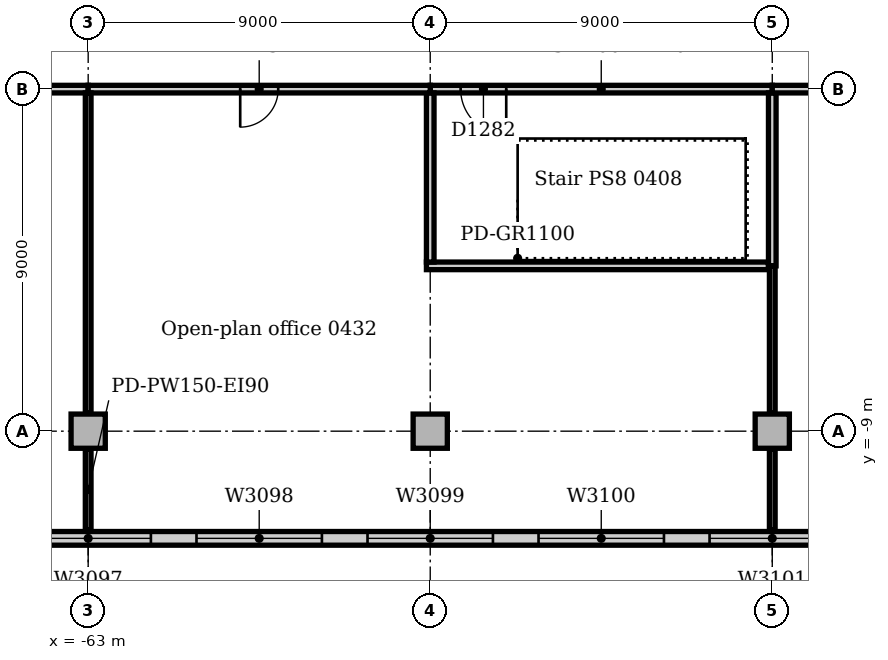
"""IFC4 building model, lengths in metres.
Left out: names, types, materials, properties, quantities, classifications, styles, units other than length and angle.
Written with IfcOpenShell. Run it as: python <this file> out.ifc"""

import sys

from ifc_helpers import new_model, si_unit, direction, frame, frame_2d, origin, origin_2d, place, context, subcontext, project, spatial, rectangle, extrude, element, fill, save


model = new_model("IFC4")
c1 = context("Model", 3, precision=1e-05, world=origin(), true_north=direction((0.0, 1.0)))
c2 = subcontext(c1, "Body", "Model", "MODEL_VIEW")
j1 = project(units=[si_unit("LENGTHUNIT", "METRE"), si_unit("PLANEANGLEUNIT", "RADIAN")], contexts=[c1])
p1 = place(None, origin())
s1 = spatial("IfcSite", under=j1, at=p1, CompositionType="ELEMENT")
p2 = place(p1, origin())
s2 = spatial("IfcBuilding", under=s1, at=p2, CompositionType="ELEMENT")
p3 = place(p2, frame((0.0, 0.0, 21.0)))
s3 = spatial("IfcBuildingStorey", under=s2, at=p3, CompositionType="ELEMENT", Elevation=21.0)
for number, where, z_axis, x_axis in (
    (1, (-63.0, -9.0, 0.0), (0.0, 0.0, 1.0), (1.0, 0.0, 0.0)),
    (2, (-54.0, -9.0, 0.0), (0.0, 0.0, 1.0), (1.0, 0.0, 0.0)),
    (3, (-45.0, -9.0, 0.0), (0.0, 0.0, 1.0), (1.0, 0.0, 0.0)),
):
    element("IfcColumn", number, at=place(p3, frame(where, z_axis=z_axis, x_axis=x_axis)), inside=s3, PredefinedType="COLUMN", context=c2, shape_type="SweptSolid", body=[
        extrude(rectangle(XDim=0.9, YDim=0.9, at=origin_2d()), origin(), (0.0, 0.0, 1.0), 4.7),
    ])
p4 = place(p3, frame((-81.0, -11.82, 0.0), z_axis=(0.0, 0.0, 1.0), x_axis=(1.0, 0.0, 0.0)))
e4 = element("IfcWall", 4, at=p4, inside=s3, PredefinedType="STANDARD", context=c2, shape_type="SweptSolid", body=[
    extrude(rectangle(XDim=144.0, YDim=0.36, at=frame_2d((72.0, 0.0))), origin(), (0.0, 0.0, 1.0), 4.85),
])
p5 = place(p4, frame((2.85, 0.0, 0.9)))
e5 = element("IfcOpeningElement", 5, at=p5, cuts=e4, PredefinedType="OPENING", context=c2, shape_type="SweptSolid", body=[
    extrude(rectangle(XDim=3.3, YDim=2.4, at=frame_2d((1.65, 1.2))), frame((0.0, 0.19, 0.0), z_axis=(0.0, -1.0, 0.0), x_axis=(1.0, 0.0, 0.0)), (0.0, 0.0, 1.0), 0.38),
])
p6 = place(p4, frame((7.35, 0.0, 0.9)))
e6 = element("IfcOpeningElement", 6, at=p6, cuts=e4, PredefinedType="OPENING", context=c2, shape_type="SweptSolid", body=[
    extrude(rectangle(XDim=3.3, YDim=2.4, at=frame_2d((1.65, 1.2))), frame((0.0, 0.19, 0.0), z_axis=(0.0, -1.0, 0.0), x_axis=(1.0, 0.0, 0.0)), (0.0, 0.0, 1.0), 0.38),
])
p7 = place(p4, frame((11.85, 0.0, 0.9)))
e7 = element("IfcOpeningElement", 7, at=p7, cuts=e4, PredefinedType="OPENING", context=c2, shape_type="SweptSolid", body=[
    extrude(rectangle(XDim=3.3, YDim=2.4, at=frame_2d((1.65, 1.2))), frame((0.0, 0.19, 0.0), z_axis=(0.0, -1.0, 0.0), x_axis=(1.0, 0.0, 0.0)), (0.0, 0.0, 1.0), 0.38),
])
p8 = place(p4, frame((16.35, 0.0, 0.9)))
e8 = element("IfcOpeningElement", 8, at=p8, cuts=e4, PredefinedType="OPENING", context=c2, shape_type="SweptSolid", body=[
    extrude(rectangle(XDim=3.3, YDim=2.4, at=frame_2d((1.65, 1.2))), frame((0.0, 0.19, 0.0), z_axis=(0.0, -1.0, 0.0), x_axis=(1.0, 0.0, 0.0)), (0.0, 0.0, 1.0), 0.38),
])
p9 = place(p4, frame((20.85, 0.0, 0.9)))
e9 = element("IfcOpeningElement", 9, at=p9, cuts=e4, PredefinedType="OPENING", context=c2, shape_type="SweptSolid", body=[
    extrude(rectangle(XDim=3.3, YDim=2.4, at=frame_2d((1.65, 1.2))), frame((0.0, 0.19, 0.0), z_axis=(0.0, -1.0, 0.0), x_axis=(1.0, 0.0, 0.0)), (0.0, 0.0, 1.0), 0.38),
])
p10 = place(p4, frame((25.35, 0.0, 0.9)))
e10 = element("IfcOpeningElement", 10, at=p10, cuts=e4, PredefinedType="OPENING", context=c2, shape_type="SweptSolid", body=[
    extrude(rectangle(XDim=3.3, YDim=2.4, at=frame_2d((1.65, 1.2))), frame((0.0, 0.19, 0.0), z_axis=(0.0, -1.0, 0.0), x_axis=(1.0, 0.0, 0.0)), (0.0, 0.0, 1.0), 0.38),
])
p11 = place(p4, frame((29.85, 0.0, 0.9)))
e11 = element("IfcOpeningElement", 11, at=p11, cuts=e4, PredefinedType="OPENING", context=c2, shape_type="SweptSolid", body=[
    extrude(rectangle(XDim=3.3, YDim=2.4, at=frame_2d((1.65, 1.2))), frame((0.0, 0.19, 0.0), z_axis=(0.0, -1.0, 0.0), x_axis=(1.0, 0.0, 0.0)), (0.0, 0.0, 1.0), 0.38),
])
p12 = place(p4, frame((34.35, 0.0, 0.9)))
e12 = element("IfcOpeningElement", 12, at=p12, cuts=e4, PredefinedType="OPENING", context=c2, shape_type="SweptSolid", body=[
    extrude(rectangle(XDim=3.3, YDim=2.4, at=frame_2d((1.65, 1.2))), frame((0.0, 0.19, 0.0), z_axis=(0.0, -1.0, 0.0), x_axis=(1.0, 0.0, 0.0)), (0.0, 0.0, 1.0), 0.38),
])
p13 = place(p4, frame((38.85, 0.0, 0.9)))
e13 = element("IfcOpeningElement", 13, at=p13, cuts=e4, PredefinedType="OPENING", context=c2, shape_type="SweptSolid", body=[
    extrude(rectangle(XDim=3.3, YDim=2.4, at=frame_2d((1.65, 1.2))), frame((0.0, 0.19, 0.0), z_axis=(0.0, -1.0, 0.0), x_axis=(1.0, 0.0, 0.0)), (0.0, 0.0, 1.0), 0.38),
])
p14 = place(p4, frame((43.35, 0.0, 0.9)))
e14 = element("IfcOpeningElement", 14, at=p14, cuts=e4, PredefinedType="OPENING", context=c2, shape_type="SweptSolid", body=[
    extrude(rectangle(XDim=3.3, YDim=2.4, at=frame_2d((1.65, 1.2))), frame((0.0, 0.19, 0.0), z_axis=(0.0, -1.0, 0.0), x_axis=(1.0, 0.0, 0.0)), (0.0, 0.0, 1.0), 0.38),
])
p15 = place(p4, frame((47.85, 0.0, 0.9)))
e15 = element("IfcOpeningElement", 15, at=p15, cuts=e4, PredefinedType="OPENING", context=c2, shape_type="SweptSolid", body=[
    extrude(rectangle(XDim=3.3, YDim=2.4, at=frame_2d((1.65, 1.2))), frame((0.0, 0.19, 0.0), z_axis=(0.0, -1.0, 0.0), x_axis=(1.0, 0.0, 0.0)), (0.0, 0.0, 1.0), 0.38),
])
p16 = place(p4, frame((52.35, 0.0, 0.9)))
e16 = element("IfcOpeningElement", 16, at=p16, cuts=e4, PredefinedType="OPENING", context=c2, shape_type="SweptSolid", body=[
    extrude(rectangle(XDim=3.3, YDim=2.4, at=frame_2d((1.65, 1.2))), frame((0.0, 0.19, 0.0), z_axis=(0.0, -1.0, 0.0), x_axis=(1.0, 0.0, 0.0)), (0.0, 0.0, 1.0), 0.38),
])
p17 = place(p4, frame((56.85, 0.0, 0.9)))
e17 = element("IfcOpeningElement", 17, at=p17, cuts=e4, PredefinedType="OPENING", context=c2, shape_type="SweptSolid", body=[
    extrude(rectangle(XDim=3.3, YDim=2.4, at=frame_2d((1.65, 1.2))), frame((0.0, 0.19, 0.0), z_axis=(0.0, -1.0, 0.0), x_axis=(1.0, 0.0, 0.0)), (0.0, 0.0, 1.0), 0.38),
])
p18 = place(p4, frame((61.35, 0.0, 0.9)))
e18 = element("IfcOpeningElement", 18, at=p18, cuts=e4, PredefinedType="OPENING", context=c2, shape_type="SweptSolid", body=[
    extrude(rectangle(XDim=3.3, YDim=2.4, at=frame_2d((1.65, 1.2))), frame((0.0, 0.19, 0.0), z_axis=(0.0, -1.0, 0.0), x_axis=(1.0, 0.0, 0.0)), (0.0, 0.0, 1.0), 0.38),
])
p19 = place(p4, frame((65.85, 0.0, 0.9)))
e19 = element("IfcOpeningElement", 19, at=p19, cuts=e4, PredefinedType="OPENING", context=c2, shape_type="SweptSolid", body=[
    extrude(rectangle(XDim=3.3, YDim=2.4, at=frame_2d((1.65, 1.2))), frame((0.0, 0.19, 0.0), z_axis=(0.0, -1.0, 0.0), x_axis=(1.0, 0.0, 0.0)), (0.0, 0.0, 1.0), 0.38),
])
p20 = place(p4, frame((70.35, 0.0, 0.9)))
e20 = element("IfcOpeningElement", 20, at=p20, cuts=e4, PredefinedType="OPENING", context=c2, shape_type="SweptSolid", body=[
    extrude(rectangle(XDim=3.3, YDim=2.4, at=frame_2d((1.65, 1.2))), frame((0.0, 0.19, 0.0), z_axis=(0.0, -1.0, 0.0), x_axis=(1.0, 0.0, 0.0)), (0.0, 0.0, 1.0), 0.38),
])
p21 = place(p4, frame((74.85, 0.0, 0.9)))
e21 = element("IfcOpeningElement", 21, at=p21, cuts=e4, PredefinedType="OPENING", context=c2, shape_type="SweptSolid", body=[
    extrude(rectangle(XDim=3.3, YDim=2.4, at=frame_2d((1.65, 1.2))), frame((0.0, 0.19, 0.0), z_axis=(0.0, -1.0, 0.0), x_axis=(1.0, 0.0, 0.0)), (0.0, 0.0, 1.0), 0.38),
])
p22 = place(p4, frame((79.35, 0.0, 0.9)))
e22 = element("IfcOpeningElement", 22, at=p22, cuts=e4, PredefinedType="OPENING", context=c2, shape_type="SweptSolid", body=[
    extrude(rectangle(XDim=3.3, YDim=2.4, at=frame_2d((1.65, 1.2))), frame((0.0, 0.19, 0.0), z_axis=(0.0, -1.0, 0.0), x_axis=(1.0, 0.0, 0.0)), (0.0, 0.0, 1.0), 0.38),
])
p23 = place(p4, frame((83.85, 0.0, 0.9)))
e23 = element("IfcOpeningElement", 23, at=p23, cuts=e4, PredefinedType="OPENING", context=c2, shape_type="SweptSolid", body=[
    extrude(rectangle(XDim=3.3, YDim=2.4, at=frame_2d((1.65, 1.2))), frame((0.0, 0.19, 0.0), z_axis=(0.0, -1.0, 0.0), x_axis=(1.0, 0.0, 0.0)), (0.0, 0.0, 1.0), 0.38),
])
p24 = place(p4, frame((88.35, 0.0, 0.9)))
e24 = element("IfcOpeningElement", 24, at=p24, cuts=e4, PredefinedType="OPENING", context=c2, shape_type="SweptSolid", body=[
    extrude(rectangle(XDim=3.3, YDim=2.4, at=frame_2d((1.65, 1.2))), frame((0.0, 0.19, 0.0), z_axis=(0.0, -1.0, 0.0), x_axis=(1.0, 0.0, 0.0)), (0.0, 0.0, 1.0), 0.38),
])
p25 = place(p4, frame((92.85, 0.0, 0.9)))
e25 = element("IfcOpeningElement", 25, at=p25, cuts=e4, PredefinedType="OPENING", context=c2, shape_type="SweptSolid", body=[
    extrude(rectangle(XDim=3.3, YDim=2.4, at=frame_2d((1.65, 1.2))), frame((0.0, 0.19, 0.0), z_axis=(0.0, -1.0, 0.0), x_axis=(1.0, 0.0, 0.0)), (0.0, 0.0, 1.0), 0.38),
])
p26 = place(p4, frame((97.35, 0.0, 0.9)))
e26 = element("IfcOpeningElement", 26, at=p26, cuts=e4, PredefinedType="OPENING", context=c2, shape_type="SweptSolid", body=[
    extrude(rectangle(XDim=3.3, YDim=2.4, at=frame_2d((1.65, 1.2))), frame((0.0, 0.19, 0.0), z_axis=(0.0, -1.0, 0.0), x_axis=(1.0, 0.0, 0.0)), (0.0, 0.0, 1.0), 0.38),
])
p27 = place(p4, frame((101.85, 0.0, 0.9)))
e27 = element("IfcOpeningElement", 27, at=p27, cuts=e4, PredefinedType="OPENING", context=c2, shape_type="SweptSolid", body=[
    extrude(rectangle(XDim=3.3, YDim=2.4, at=frame_2d((1.65, 1.2))), frame((0.0, 0.19, 0.0), z_axis=(0.0, -1.0, 0.0), x_axis=(1.0, 0.0, 0.0)), (0.0, 0.0, 1.0), 0.38),
])
p28 = place(p4, frame((106.35, 0.0, 0.9)))
e28 = element("IfcOpeningElement", 28, at=p28, cuts=e4, PredefinedType="OPENING", context=c2, shape_type="SweptSolid", body=[
    extrude(rectangle(XDim=3.3, YDim=2.4, at=frame_2d((1.65, 1.2))), frame((0.0, 0.19, 0.0), z_axis=(0.0, -1.0, 0.0), x_axis=(1.0, 0.0, 0.0)), (0.0, 0.0, 1.0), 0.38),
])
p29 = place(p4, frame((110.85, 0.0, 0.9)))
e29 = element("IfcOpeningElement", 29, at=p29, cuts=e4, PredefinedType="OPENING", context=c2, shape_type="SweptSolid", body=[
    extrude(rectangle(XDim=3.3, YDim=2.4, at=frame_2d((1.65, 1.2))), frame((0.0, 0.19, 0.0), z_axis=(0.0, -1.0, 0.0), x_axis=(1.0, 0.0, 0.0)), (0.0, 0.0, 1.0), 0.38),
])
p30 = place(p4, frame((115.35, 0.0, 0.9)))
e30 = element("IfcOpeningElement", 30, at=p30, cuts=e4, PredefinedType="OPENING", context=c2, shape_type="SweptSolid", body=[
    extrude(rectangle(XDim=3.3, YDim=2.4, at=frame_2d((1.65, 1.2))), frame((0.0, 0.19, 0.0), z_axis=(0.0, -1.0, 0.0), x_axis=(1.0, 0.0, 0.0)), (0.0, 0.0, 1.0), 0.38),
])
p31 = place(p4, frame((119.85, 0.0, 0.9)))
e31 = element("IfcOpeningElement", 31, at=p31, cuts=e4, PredefinedType="OPENING", context=c2, shape_type="SweptSolid", body=[
    extrude(rectangle(XDim=3.3, YDim=2.4, at=frame_2d((1.65, 1.2))), frame((0.0, 0.19, 0.0), z_axis=(0.0, -1.0, 0.0), x_axis=(1.0, 0.0, 0.0)), (0.0, 0.0, 1.0), 0.38),
])
p32 = place(p4, frame((124.35, 0.0, 0.9)))
e32 = element("IfcOpeningElement", 32, at=p32, cuts=e4, PredefinedType="OPENING", context=c2, shape_type="SweptSolid", body=[
    extrude(rectangle(XDim=3.3, YDim=2.4, at=frame_2d((1.65, 1.2))), frame((0.0, 0.19, 0.0), z_axis=(0.0, -1.0, 0.0), x_axis=(1.0, 0.0, 0.0)), (0.0, 0.0, 1.0), 0.38),
])
p33 = place(p4, frame((128.85, 0.0, 0.9)))
e33 = element("IfcOpeningElement", 33, at=p33, cuts=e4, PredefinedType="OPENING", context=c2, shape_type="SweptSolid", body=[
    extrude(rectangle(XDim=3.3, YDim=2.4, at=frame_2d((1.65, 1.2))), frame((0.0, 0.19, 0.0), z_axis=(0.0, -1.0, 0.0), x_axis=(1.0, 0.0, 0.0)), (0.0, 0.0, 1.0), 0.38),
])
p34 = place(p4, frame((133.35, 0.0, 0.9)))
e34 = element("IfcOpeningElement", 34, at=p34, cuts=e4, PredefinedType="OPENING", context=c2, shape_type="SweptSolid", body=[
    extrude(rectangle(XDim=3.3, YDim=2.4, at=frame_2d((1.65, 1.2))), frame((0.0, 0.19, 0.0), z_axis=(0.0, -1.0, 0.0), x_axis=(1.0, 0.0, 0.0)), (0.0, 0.0, 1.0), 0.38),
])
p35 = place(p4, frame((137.85, 0.0, 0.9)))
e35 = element("IfcOpeningElement", 35, at=p35, cuts=e4, PredefinedType="OPENING", context=c2, shape_type="SweptSolid", body=[
    extrude(rectangle(XDim=3.3, YDim=2.4, at=frame_2d((1.65, 1.2))), frame((0.0, 0.19, 0.0), z_axis=(0.0, -1.0, 0.0), x_axis=(1.0, 0.0, 0.0)), (0.0, 0.0, 1.0), 0.38),
])
p36 = place(p3, frame((-54.0, 0.0, 0.0), z_axis=(0.0, 0.0, 1.0), x_axis=(1.0, 0.0, 0.0)))
e36 = element("IfcWall", 36, at=p36, inside=s3, PredefinedType="SOLIDWALL", context=c2, shape_type="SweptSolid", body=[
    extrude(rectangle(XDim=9.0, YDim=0.2, at=frame_2d((4.5, 0.0))), origin(), (0.0, 0.0, 1.0), 4.7),
])
p37 = place(p36, frame((0.8, 0.0, 0.0)))
e37 = element("IfcOpeningElement", 37, at=p37, cuts=e36, PredefinedType="OPENING", context=c2, shape_type="SweptSolid", body=[
    extrude(rectangle(XDim=1.2, YDim=2.1, at=frame_2d((0.6, 1.05))), frame((0.0, 0.11, 0.0), z_axis=(0.0, -1.0, 0.0), x_axis=(1.0, 0.0, 0.0)), (0.0, 0.0, 1.0), 0.22),
])
p38 = place(p3, frame((-54.1, -4.65, 0.0), z_axis=(0.0, 0.0, 1.0), x_axis=(1.0, 0.0, 0.0)))
e38 = element("IfcWall", 38, at=p38, inside=s3, PredefinedType="SOLIDWALL", context=c2, shape_type="SweptSolid", body=[
    extrude(rectangle(XDim=9.0, YDim=0.2, at=frame_2d((4.5, 0.0))), origin(), (0.0, 0.0, 1.0), 4.7),
])
p39 = place(p3, frame((-54.0, -4.55, 0.0), z_axis=(0.0, 0.0, 1.0), x_axis=(0.0, 1.0, 0.0)))
e39 = element("IfcWall", 39, at=p39, inside=s3, PredefinedType="SOLIDWALL", context=c2, shape_type="SweptSolid", body=[
    extrude(rectangle(XDim=4.45, YDim=0.2, at=frame_2d((2.225, 0.0))), origin(), (0.0, 0.0, 1.0), 4.7),
])
p40 = place(p3, frame((-45.0, -4.65, 0.0), z_axis=(0.0, 0.0, 1.0), x_axis=(0.0, 1.0, 0.0)))
e40 = element("IfcWall", 40, at=p40, inside=s3, PredefinedType="SOLIDWALL", context=c2, shape_type="SweptSolid", body=[
    extrude(rectangle(XDim=4.55, YDim=0.2, at=frame_2d((2.275, 0.0))), origin(), (0.0, 0.0, 1.0), 4.7),
])
p41 = place(p3, frame((-71.53, 0.0, 0.0), z_axis=(0.0, 0.0, 1.0), x_axis=(1.0, 0.0, 0.0)))
e41 = element("IfcWall", 41, at=p41, inside=s3, PredefinedType="PARTITIONING", context=c2, shape_type="SweptSolid", body=[
    extrude(rectangle(XDim=8.53, YDim=0.2, at=frame_2d((4.265, 0.0))), origin(), (0.0, 0.0, 1.0), 4.7),
])
p42 = place(p41, frame((3.53, 0.0, 0.0)))
e42 = element("IfcOpeningElement", 42, at=p42, cuts=e41, PredefinedType="OPENING", context=c2, shape_type="SweptSolid", body=[
    extrude(rectangle(XDim=1.0, YDim=2.1, at=frame_2d((0.5, 1.05))), frame((0.0, 0.11, 0.0), z_axis=(0.0, -1.0, 0.0), x_axis=(1.0, 0.0, 0.0)), (0.0, 0.0, 1.0), 0.22),
])
p43 = place(p3, frame((-63.0, 0.0, 0.0), z_axis=(0.0, 0.0, 1.0), x_axis=(1.0, 0.0, 0.0)))
e43 = element("IfcWall", 43, at=p43, inside=s3, PredefinedType="PARTITIONING", context=c2, shape_type="SweptSolid", body=[
    extrude(rectangle(XDim=9.0, YDim=0.2, at=frame_2d((4.5, 0.0))), origin(), (0.0, 0.0, 1.0), 4.7),
])
p44 = place(p43, frame((4.0, 0.0, 0.0)))
e44 = element("IfcOpeningElement", 44, at=p44, cuts=e43, PredefinedType="OPENING", context=c2, shape_type="SweptSolid", body=[
    extrude(rectangle(XDim=1.0, YDim=2.1, at=frame_2d((0.5, 1.05))), frame((0.0, 0.11, 0.0), z_axis=(0.0, -1.0, 0.0), x_axis=(1.0, 0.0, 0.0)), (0.0, 0.0, 1.0), 0.22),
])
p45 = place(p3, frame((-45.0, 0.0, 0.0), z_axis=(0.0, 0.0, 1.0), x_axis=(1.0, 0.0, 0.0)))
e45 = element("IfcWall", 45, at=p45, inside=s3, PredefinedType="PARTITIONING", context=c2, shape_type="SweptSolid", body=[
    extrude(rectangle(XDim=9.0, YDim=0.2, at=frame_2d((4.5, 0.0))), origin(), (0.0, 0.0, 1.0), 4.7),
])
p46 = place(p45, frame((4.0, 0.0, 0.0)))
e46 = element("IfcOpeningElement", 46, at=p46, cuts=e45, PredefinedType="OPENING", context=c2, shape_type="SweptSolid", body=[
    extrude(rectangle(XDim=1.0, YDim=2.1, at=frame_2d((0.5, 1.05))), frame((0.0, 0.11, 0.0), z_axis=(0.0, -1.0, 0.0), x_axis=(1.0, 0.0, 0.0)), (0.0, 0.0, 1.0), 0.22),
])
p47 = place(p3, frame((-63.0, -11.6, 0.0), z_axis=(0.0, 0.0, 1.0), x_axis=(0.0, 1.0, 0.0)))
e47 = element("IfcWall", 47, at=p47, inside=s3, PredefinedType="PARTITIONING", context=c2, shape_type="SweptSolid", body=[
    extrude(rectangle(XDim=2.13, YDim=0.15, at=frame_2d((1.065, 0.0))), origin(), (0.0, 0.0, 1.0), 4.7),
])
p48 = place(p3, frame((-63.0, -8.53, 0.0), z_axis=(0.0, 0.0, 1.0), x_axis=(0.0, 1.0, 0.0)))
e48 = element("IfcWall", 48, at=p48, inside=s3, PredefinedType="PARTITIONING", context=c2, shape_type="SweptSolid", body=[
    extrude(rectangle(XDim=8.43, YDim=0.15, at=frame_2d((4.215, 0.0))), origin(), (0.0, 0.0, 1.0), 4.7),
])
p49 = place(p3, frame((-45.0, -11.6, 0.0), z_axis=(0.0, 0.0, 1.0), x_axis=(0.0, 1.0, 0.0)))
e49 = element("IfcWall", 49, at=p49, inside=s3, PredefinedType="PARTITIONING", context=c2, shape_type="SweptSolid", body=[
    extrude(rectangle(XDim=2.13, YDim=0.15, at=frame_2d((1.065, 0.0))), origin(), (0.0, 0.0, 1.0), 4.7),
])
p50 = place(p3, frame((-45.0, -8.53, 0.0), z_axis=(0.0, 0.0, 1.0), x_axis=(0.0, 1.0, 0.0)))
e50 = element("IfcWall", 50, at=p50, inside=s3, PredefinedType="PARTITIONING", context=c2, shape_type="SweptSolid", body=[
    extrude(rectangle(XDim=3.88, YDim=0.15, at=frame_2d((1.94, 0.0))), origin(), (0.0, 0.0, 1.0), 4.7),
])
p51 = place(p8, origin())
e51 = element("IfcWindow", 51, at=p51, inside=s3, PartitioningType="SINGLE_PANEL", PredefinedType="WINDOW", context=c2, shape_type="SweptSolid", body=[
    extrude(rectangle(XDim=3.3, YDim=2.4, at=frame_2d((1.65, 1.2))), frame((0.0, 0.13, 0.0), z_axis=(0.0, -1.0, 0.0), x_axis=(1.0, 0.0, 0.0)), (0.0, 0.0, 1.0), 0.06),
])
fill(e8, e51)
p52 = place(p9, origin())
e52 = element("IfcWindow", 52, at=p52, inside=s3, PartitioningType="SINGLE_PANEL", PredefinedType="WINDOW", context=c2, shape_type="SweptSolid", body=[
    extrude(rectangle(XDim=3.3, YDim=2.4, at=frame_2d((1.65, 1.2))), frame((0.0, 0.13, 0.0), z_axis=(0.0, -1.0, 0.0), x_axis=(1.0, 0.0, 0.0)), (0.0, 0.0, 1.0), 0.06),
])
fill(e9, e52)
p53 = place(p10, origin())
e53 = element("IfcWindow", 53, at=p53, inside=s3, PartitioningType="SINGLE_PANEL", PredefinedType="WINDOW", context=c2, shape_type="SweptSolid", body=[
    extrude(rectangle(XDim=3.3, YDim=2.4, at=frame_2d((1.65, 1.2))), frame((0.0, 0.13, 0.0), z_axis=(0.0, -1.0, 0.0), x_axis=(1.0, 0.0, 0.0)), (0.0, 0.0, 1.0), 0.06),
])
fill(e10, e53)
p54 = place(p11, origin())
e54 = element("IfcWindow", 54, at=p54, inside=s3, PartitioningType="SINGLE_PANEL", PredefinedType="WINDOW", context=c2, shape_type="SweptSolid", body=[
    extrude(rectangle(XDim=3.3, YDim=2.4, at=frame_2d((1.65, 1.2))), frame((0.0, 0.13, 0.0), z_axis=(0.0, -1.0, 0.0), x_axis=(1.0, 0.0, 0.0)), (0.0, 0.0, 1.0), 0.06),
])
fill(e11, e54)
p55 = place(p12, origin())
e55 = element("IfcWindow", 55, at=p55, inside=s3, PartitioningType="SINGLE_PANEL", PredefinedType="WINDOW", context=c2, shape_type="SweptSolid", body=[
    extrude(rectangle(XDim=3.3, YDim=2.4, at=frame_2d((1.65, 1.2))), frame((0.0, 0.13, 0.0), z_axis=(0.0, -1.0, 0.0), x_axis=(1.0, 0.0, 0.0)), (0.0, 0.0, 1.0), 0.06),
])
fill(e12, e55)
p56 = place(p44, frame((1.0, 0.0, 0.0), z_axis=(0.0, 0.0, 1.0), x_axis=(-1.0, 0.0, 0.0)))
e56 = element("IfcDoor", 56, at=p56, inside=s3, OperationType="SINGLE_SWING_RIGHT", PredefinedType="DOOR", context=c2, shape_type="SweptSolid", body=[
    extrude(rectangle(XDim=1.0, YDim=2.1, at=frame_2d((0.5, 1.05))), frame((0.0, 0.025, 0.0), z_axis=(0.0, -1.0, 0.0), x_axis=(1.0, 0.0, 0.0)), (0.0, 0.0, 1.0), 0.05),
])
fill(e44, e56)
p57 = place(p37, frame((1.2, 0.0, 0.0), z_axis=(0.0, 0.0, 1.0), x_axis=(-1.0, 0.0, 0.0)))
e57 = element("IfcDoor", 57, at=p57, inside=s3, OperationType="SINGLE_SWING_LEFT", PredefinedType="DOOR", context=c2, shape_type="SweptSolid", body=[
    extrude(rectangle(XDim=1.2, YDim=2.1, at=frame_2d((0.6, 1.05))), frame((0.0, 0.025, 0.0), z_axis=(0.0, -1.0, 0.0), x_axis=(1.0, 0.0, 0.0)), (0.0, 0.0, 1.0), 0.05),
])
fill(e37, e57)
save(model, sys.argv[1])
